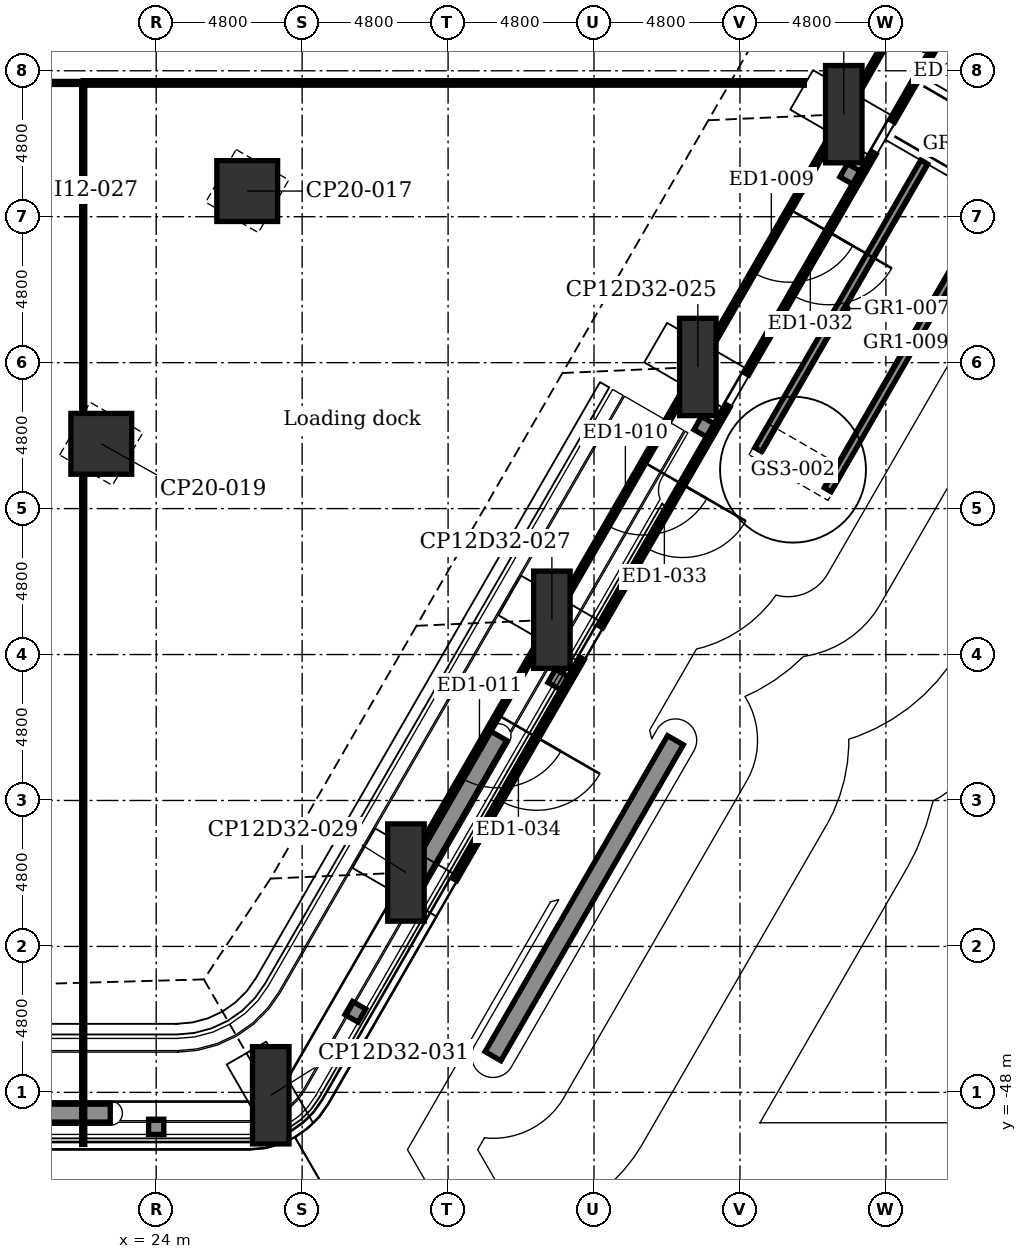
"""IFC4 building model, lengths in metres.
Left out: names, types, materials, properties, quantities, classifications, styles, units other than length and angle.
Written with IfcOpenShell. Run it as: python <this file> out.ifc"""

import sys

from ifc_helpers import new_model, si_unit, direction, frame, frame_2d, origin, origin_2d, place, context, subcontext, project, spatial, polyline, rectangle, outline, extrude, element, fill, save


model = new_model("IFC4")
c1 = context("Model", 3, precision=1e-05, world=origin(), true_north=direction((0.0, 1.0)))
c2 = subcontext(c1, "Body", "Model", "MODEL_VIEW")
j1 = project(units=[si_unit("LENGTHUNIT", "METRE"), si_unit("PLANEANGLEUNIT", "RADIAN")], contexts=[c1])
p1 = place(None, origin())
s1 = spatial("IfcSite", under=j1, at=p1, CompositionType="ELEMENT")
p2 = place(p1, origin())
s2 = spatial("IfcBuilding", under=s1, at=p2, CompositionType="ELEMENT")
p3 = place(p2, origin())
s3 = spatial("IfcBuildingStorey", under=s2, at=p3, CompositionType="ELEMENT", Elevation=0.0)
for number, where, z_axis, x_axis in (
    (1, (46.614, -15.828, -0.4), (0.0, 0.0, 1.0), (0.5, 0.866, 0.0)),
    (2, (41.814, -24.142, -0.4), (0.0, 0.0, 1.0), (0.5, 0.866, 0.0)),
    (3, (37.014, -32.455, -0.4), (0.0, 0.0, 1.0), (0.5, 0.866, 0.0)),
    (4, (32.214, -40.769, -0.4), (0.0, 0.0, 1.0), (0.5, 0.866, 0.0)),
    (5, (27.768, -48.095, -0.4), (0.0, 0.0, 1.0), (0.866, 0.5, 0.0)),
):
    element("IfcColumn", number, at=place(p3, frame(where, z_axis=z_axis, x_axis=x_axis)), inside=s3, PredefinedType="COLUMN", context=c2, shape_type="SweptSolid", body=[
        extrude(rectangle(XDim=1.2, YDim=3.2, at=origin_2d()), origin(), (0.0, 0.0, 1.0), 7.1),
    ])
for number, where, z_axis, x_axis in (
    (6, (26.994, -18.356, -0.4), (0.0, 0.0, 1.0), (0.5, 0.866, 0.0)),
    (7, (22.194, -26.67, -0.4), (0.0, 0.0, 1.0), (0.5, 0.866, 0.0)),
):
    element("IfcColumn", number, at=place(p3, frame(where, z_axis=z_axis, x_axis=x_axis)), inside=s3, PredefinedType="COLUMN", context=c2, shape_type="SweptSolid", body=[
        extrude(rectangle(XDim=2.0, YDim=2.0, at=origin_2d()), origin(), (0.0, 0.0, 1.0), 7.1),
    ])
p4 = place(p3, frame((51.131, -8.045, 0.0), z_axis=(0.0, 0.0, 1.0), x_axis=(-0.49999513524, -0.866028212437, 0.0)))
e8 = element("IfcWall", 8, at=p4, inside=s3, PredefinedType="PARTITIONING", context=c2, shape_type="SweptSolid", body=[
    extrude(rectangle(XDim=8.396, YDim=0.16, at=frame_2d((4.198, 0.0))), origin(), (0.0, 0.0, 1.0), 6.7),
])
p5 = place(p4, frame((2.998, 0.0, 0.0)))
e9 = element("IfcOpeningElement", 9, at=p5, cuts=e8, PredefinedType="OPENING", context=c2, shape_type="SweptSolid", body=[
    extrude(rectangle(XDim=2.4, YDim=2.4, at=frame_2d((1.2, 1.2))), frame((0.0, 0.09, 0.0), z_axis=(0.0, -1.0, 0.0), x_axis=(1.0, 0.0, 0.0)), (0.0, 0.0, 1.0), 0.18),
])
p6 = place(p3, frame((46.331, -16.359, 0.0), z_axis=(0.0, 0.0, 1.0), x_axis=(-0.500007726539, -0.866020942819, 0.0)))
e10 = element("IfcWall", 10, at=p6, inside=s3, PredefinedType="PARTITIONING", context=c2, shape_type="SweptSolid", body=[
    extrude(rectangle(XDim=8.396, YDim=0.16, at=frame_2d((4.198, 0.0))), origin(), (0.0, 0.0, 1.0), 6.7),
])
p7 = place(p6, frame((2.998, 0.0, 0.0)))
e11 = element("IfcOpeningElement", 11, at=p7, cuts=e10, PredefinedType="OPENING", context=c2, shape_type="SweptSolid", body=[
    extrude(rectangle(XDim=2.4, YDim=2.4, at=frame_2d((1.2, 1.2))), frame((0.0, 0.09, 0.0), z_axis=(0.0, -1.0, 0.0), x_axis=(1.0, 0.0, 0.0)), (0.0, 0.0, 1.0), 0.18),
])
p8 = place(p3, frame((41.531, -24.673, 0.0), z_axis=(0.0, 0.0, 1.0), x_axis=(-0.49999513524, -0.866028212437, 0.0)))
e12 = element("IfcWall", 12, at=p8, inside=s3, PredefinedType="PARTITIONING", context=c2, shape_type="SweptSolid", body=[
    extrude(rectangle(XDim=8.396, YDim=0.16, at=frame_2d((4.198, 0.0))), origin(), (0.0, 0.0, 1.0), 6.7),
])
p9 = place(p8, frame((2.998, 0.0, 0.0)))
e13 = element("IfcOpeningElement", 13, at=p9, cuts=e12, PredefinedType="OPENING", context=c2, shape_type="SweptSolid", body=[
    extrude(rectangle(XDim=2.4, YDim=2.4, at=frame_2d((1.2, 1.2))), frame((0.0, 0.09, 0.0), z_axis=(0.0, -1.0, 0.0), x_axis=(1.0, 0.0, 0.0)), (0.0, 0.0, 1.0), 0.18),
])
p10 = place(p3, frame((36.731, -32.987, 0.0), z_axis=(0.0, 0.0, 1.0), x_axis=(-0.500007726539, -0.866020942819, 0.0)))
e14 = element("IfcWall", 14, at=p10, inside=s3, PredefinedType="PARTITIONING", context=c2, shape_type="SweptSolid", body=[
    extrude(rectangle(XDim=8.396, YDim=0.16, at=frame_2d((4.198, 0.0))), origin(), (0.0, 0.0, 1.0), 6.7),
])
p11 = place(p10, frame((2.998, 0.0, 0.0)))
e15 = element("IfcOpeningElement", 15, at=p11, cuts=e14, PredefinedType="OPENING", context=c2, shape_type="SweptSolid", body=[
    extrude(rectangle(XDim=2.4, YDim=2.4, at=frame_2d((1.2, 1.2))), frame((0.0, 0.09, 0.0), z_axis=(0.0, -1.0, 0.0), x_axis=(1.0, 0.0, 0.0)), (0.0, 0.0, 1.0), 0.18),
])
p12 = place(p3, frame((52.411, -8.787, 0.0), z_axis=(0.0, 0.0, 1.0), x_axis=(-0.499996941814, -0.866027169422, 0.0)))
e16 = element("IfcWall", 16, at=p12, inside=s3, PredefinedType="PARTITIONING", context=c2, shape_type="SweptSolid", body=[
    extrude(rectangle(XDim=8.392, YDim=0.16, at=frame_2d((4.196, 0.0))), origin(), (0.0, 0.0, 1.0), 6.7),
])
p13 = place(p12, frame((2.996, 0.0, 0.0)))
e17 = element("IfcOpeningElement", 17, at=p13, cuts=e16, PredefinedType="OPENING", context=c2, shape_type="SweptSolid", body=[
    extrude(rectangle(XDim=2.4, YDim=2.4, at=frame_2d((1.2, 1.2))), frame((0.0, 0.09, 0.0), z_axis=(0.0, -1.0, 0.0), x_axis=(1.0, 0.0, 0.0)), (0.0, 0.0, 1.0), 0.18),
])
p14 = place(p3, frame((47.611, -17.101, 0.0), z_axis=(0.0, 0.0, 1.0), x_axis=(-0.500009539049, -0.866019896342, 0.0)))
e18 = element("IfcWall", 18, at=p14, inside=s3, PredefinedType="PARTITIONING", context=c2, shape_type="SweptSolid", body=[
    extrude(rectangle(XDim=8.392, YDim=0.16, at=frame_2d((4.196, 0.0))), origin(), (0.0, 0.0, 1.0), 6.7),
])
p15 = place(p14, frame((2.996, 0.0, 0.0)))
e19 = element("IfcOpeningElement", 19, at=p15, cuts=e18, PredefinedType="OPENING", context=c2, shape_type="SweptSolid", body=[
    extrude(rectangle(XDim=2.4, YDim=2.4, at=frame_2d((1.2, 1.2))), frame((0.0, 0.09, 0.0), z_axis=(0.0, -1.0, 0.0), x_axis=(1.0, 0.0, 0.0)), (0.0, 0.0, 1.0), 0.18),
])
p16 = place(p3, frame((42.811, -25.415, 0.0), z_axis=(0.0, 0.0, 1.0), x_axis=(-0.499975122566, -0.866039766301, 0.0)))
e20 = element("IfcWall", 20, at=p16, inside=s3, PredefinedType="PARTITIONING", context=c2, shape_type="SweptSolid", body=[
    extrude(rectangle(XDim=8.392, YDim=0.16, at=frame_2d((4.196, 0.0))), origin(), (0.0, 0.0, 1.0), 6.7),
])
p17 = place(p16, frame((2.996, 0.0, 0.0)))
e21 = element("IfcOpeningElement", 21, at=p17, cuts=e20, PredefinedType="OPENING", context=c2, shape_type="SweptSolid", body=[
    extrude(rectangle(XDim=2.4, YDim=2.4, at=frame_2d((1.2, 1.2))), frame((0.0, 0.09, 0.0), z_axis=(0.0, -1.0, 0.0), x_axis=(1.0, 0.0, 0.0)), (0.0, 0.0, 1.0), 0.18),
])
p18 = place(p3, frame((38.011, -33.729, 0.0), z_axis=(0.0, 0.0, 1.0), x_axis=(-0.500009539049, -0.866019896342, 0.0)))
e22 = element("IfcWall", 22, at=p18, inside=s3, PredefinedType="PARTITIONING", context=c2, shape_type="SweptSolid", body=[
    extrude(rectangle(XDim=8.392, YDim=0.16, at=frame_2d((4.196, 0.0))), origin(), (0.0, 0.0, 1.0), 6.7),
])
p19 = place(p18, frame((2.996, 0.0, 0.0)))
e23 = element("IfcOpeningElement", 23, at=p19, cuts=e22, PredefinedType="OPENING", context=c2, shape_type="SweptSolid", body=[
    extrude(rectangle(XDim=2.4, YDim=2.4, at=frame_2d((1.2, 1.2))), frame((0.0, 0.09, 0.0), z_axis=(0.0, -1.0, 0.0), x_axis=(1.0, 0.0, 0.0)), (0.0, 0.0, 1.0), 0.18),
])
for number, where, z_axis, x_axis in (
    (24, (35.27, -36.277, 7.0), (0.0, 0.0, 1.0), (-0.5, -0.866, 0.0)),
    (25, (22.489, -48.683, 7.0), (0.0, 0.0, 1.0), (-1.0, 0.0, 0.0)),
):
    element("IfcWall", number, at=place(p3, frame(where, z_axis=z_axis, x_axis=x_axis)), inside=s3, PredefinedType="USERDEFINED", context=c2, shape_type="SweptSolid", body=[
        extrude(rectangle(XDim=6.0, YDim=0.6, at=frame_2d((3.0, 0.0))), origin(), (0.0, 0.0, 1.0), 0.7),
    ])
p20 = place(p3, frame((41.077, -36.418, 0.0), z_axis=(0.0, 0.0, 1.0), x_axis=(-0.49999894854, -0.866026010844, 0.0)))
e26 = element("IfcWall", 26, at=p20, inside=s3, PredefinedType="USERDEFINED", context=c2, shape_type="SweptSolid", body=[
    extrude(rectangle(XDim=12.0, YDim=0.6, at=frame_2d((6.0, 0.0))), origin(), (0.0, 0.0, 1.0), 0.7),
])
for number, where, z_axis, x_axis in (
    (27, (43.797, -26.857, 0.0), (0.0, 0.0, 1.0), (0.5, 0.866, 0.0)),
    (28, (46.092, -28.182, 0.0), (0.0, 0.0, 1.0), (0.5, 0.866, 0.0)),
):
    element("IfcWall", number, at=place(p3, frame(where, z_axis=z_axis, x_axis=x_axis)), inside=s3, PredefinedType="SOLIDWALL", context=c2, shape_type="SweptSolid", body=[
        extrude(outline(polyline([(0.0, 0.0), (10.92, 0.0), (10.92, 7.1), (0.0, 0.275), (0.0, 0.0)])), frame((0.0, 0.125, 0.0), z_axis=(0.0, -1.0, 0.0), x_axis=(1.0, 0.0, 0.0)), (0.0, 0.0, 1.0), 0.25),
    ])
p21 = place(p3, frame((46.953, -17.582, 0.0), z_axis=(0.0, 0.0, 1.0), x_axis=(-0.499919672301, -0.866071776036, 0.0)))
e29 = element("IfcWall", 29, at=p21, inside=s3, PredefinedType="SOLIDWALL", context=c2, shape_type="SweptSolid", body=[
    extrude(rectangle(XDim=0.5, YDim=0.5, at=frame_2d((0.25, 0.0))), origin(), (0.0, 0.0, 1.0), 6.4),
])
p22 = place(p3, frame((42.153, -25.896, 0.0), z_axis=(0.0, 0.0, 1.0), x_axis=(-0.500131122175, -0.865949687125, 0.0)))
e30 = element("IfcWall", 30, at=p22, inside=s3, PredefinedType="SOLIDWALL", context=c2, shape_type="SweptSolid", body=[
    extrude(rectangle(XDim=0.5, YDim=0.5, at=frame_2d((0.25, 0.0))), origin(), (0.0, 0.0, 1.0), 6.4),
])
for number, where, z_axis, x_axis in (
    (31, (37.353, -34.209, 0.0), (0.0, 0.0, 1.0), (-0.5, -0.866, 0.0)),
    (32, (30.675, -45.135, 0.0), (0.0, 0.0, 1.0), (-0.5, -0.866, 0.0)),
    (33, (24.25, -49.133, 0.0), (0.0, 0.0, 1.0), (-1.0, 0.0, 0.0)),
):
    element("IfcWall", number, at=place(p3, frame(where, z_axis=z_axis, x_axis=x_axis)), inside=s3, PredefinedType="SOLIDWALL", context=c2, shape_type="SweptSolid", body=[
        extrude(rectangle(XDim=0.5, YDim=0.5, at=frame_2d((0.25, 0.0))), origin(), (0.0, 0.0, 1.0), 6.4),
    ])
p23 = place(p3, frame((21.6, -49.713, 0.0), z_axis=(0.0, 0.0, 1.0), x_axis=(0.0, 1.0, 0.0)))
e34 = element("IfcWall", 34, at=p23, inside=s3, PredefinedType="PARTITIONING", context=c2, shape_type="SweptSolid", body=[
    extrude(rectangle(XDim=34.913, YDim=0.1, at=frame_2d((17.457, 0.0))), origin(), (0.0, 0.0, 1.0), 6.7),
])
p24 = place(p3, frame((16.8, -14.8, 0.0), z_axis=(0.0, 0.0, 1.0), x_axis=(1.0, 0.0, 0.0)))
e35 = element("IfcWall", 35, at=p24, inside=s3, PredefinedType="PARTITIONING", context=c2, shape_type="SweptSolid", body=[
    extrude(rectangle(XDim=4.8, YDim=0.1, at=frame_2d((2.4, 0.0))), origin(), (0.0, 0.0, 1.0), 6.7),
])
p25 = place(p3, frame((21.6, -14.8, 0.0), z_axis=(0.0, 0.0, 1.0), x_axis=(1.0, 0.0, 0.0)))
e36 = element("IfcWall", 36, at=p25, inside=s3, PredefinedType="PARTITIONING", context=c2, shape_type="SweptSolid", body=[
    extrude(rectangle(XDim=23.717, YDim=0.15, at=frame_2d((11.858, 0.0))), origin(), (0.0, 0.0, 1.0), 6.7),
])
p26 = place(p7, origin())
e37 = element("IfcDoor", 37, at=p26, inside=s3, OperationType="DOUBLE_DOOR_DOUBLE_SWING", PredefinedType="DOOR", context=c2, shape_type="SweptSolid", body=[
    extrude(rectangle(XDim=2.4, YDim=2.4, at=frame_2d((1.2, 1.2))), frame((0.0, 0.025, 0.0), z_axis=(0.0, -1.0, 0.0), x_axis=(1.0, 0.0, 0.0)), (0.0, 0.0, 1.0), 0.05),
])
fill(e11, e37)
p27 = place(p9, origin())
e38 = element("IfcDoor", 38, at=p27, inside=s3, OperationType="DOUBLE_DOOR_DOUBLE_SWING", PredefinedType="DOOR", context=c2, shape_type="SweptSolid", body=[
    extrude(rectangle(XDim=2.4, YDim=2.4, at=frame_2d((1.2, 1.2))), frame((0.0, 0.025, 0.0), z_axis=(0.0, -1.0, 0.0), x_axis=(1.0, 0.0, 0.0)), (0.0, 0.0, 1.0), 0.05),
])
fill(e13, e38)
p28 = place(p11, origin())
e39 = element("IfcDoor", 39, at=p28, inside=s3, OperationType="DOUBLE_DOOR_DOUBLE_SWING", PredefinedType="DOOR", context=c2, shape_type="SweptSolid", body=[
    extrude(rectangle(XDim=2.4, YDim=2.4, at=frame_2d((1.2, 1.2))), frame((0.0, 0.025, 0.0), z_axis=(0.0, -1.0, 0.0), x_axis=(1.0, 0.0, 0.0)), (0.0, 0.0, 1.0), 0.05),
])
fill(e15, e39)
p29 = place(p15, origin())
e40 = element("IfcDoor", 40, at=p29, inside=s3, OperationType="DOUBLE_DOOR_DOUBLE_SWING", PredefinedType="DOOR", context=c2, shape_type="SweptSolid", body=[
    extrude(rectangle(XDim=2.4, YDim=2.4, at=frame_2d((1.2, 1.2))), frame((0.0, 0.025, 0.0), z_axis=(0.0, -1.0, 0.0), x_axis=(1.0, 0.0, 0.0)), (0.0, 0.0, 1.0), 0.05),
])
fill(e19, e40)
p30 = place(p17, origin())
e41 = element("IfcDoor", 41, at=p30, inside=s3, OperationType="DOUBLE_DOOR_DOUBLE_SWING", PredefinedType="DOOR", context=c2, shape_type="SweptSolid", body=[
    extrude(rectangle(XDim=2.4, YDim=2.4, at=frame_2d((1.2, 1.2))), frame((0.0, 0.025, 0.0), z_axis=(0.0, -1.0, 0.0), x_axis=(1.0, 0.0, 0.0)), (0.0, 0.0, 1.0), 0.05),
])
fill(e21, e41)
p31 = place(p19, origin())
e42 = element("IfcDoor", 42, at=p31, inside=s3, OperationType="DOUBLE_DOOR_DOUBLE_SWING", PredefinedType="DOOR", context=c2, shape_type="SweptSolid", body=[
    extrude(rectangle(XDim=2.4, YDim=2.4, at=frame_2d((1.2, 1.2))), frame((0.0, 0.025, 0.0), z_axis=(0.0, -1.0, 0.0), x_axis=(1.0, 0.0, 0.0)), (0.0, 0.0, 1.0), 0.05),
])
fill(e23, e42)
save(model, sys.argv[1])
